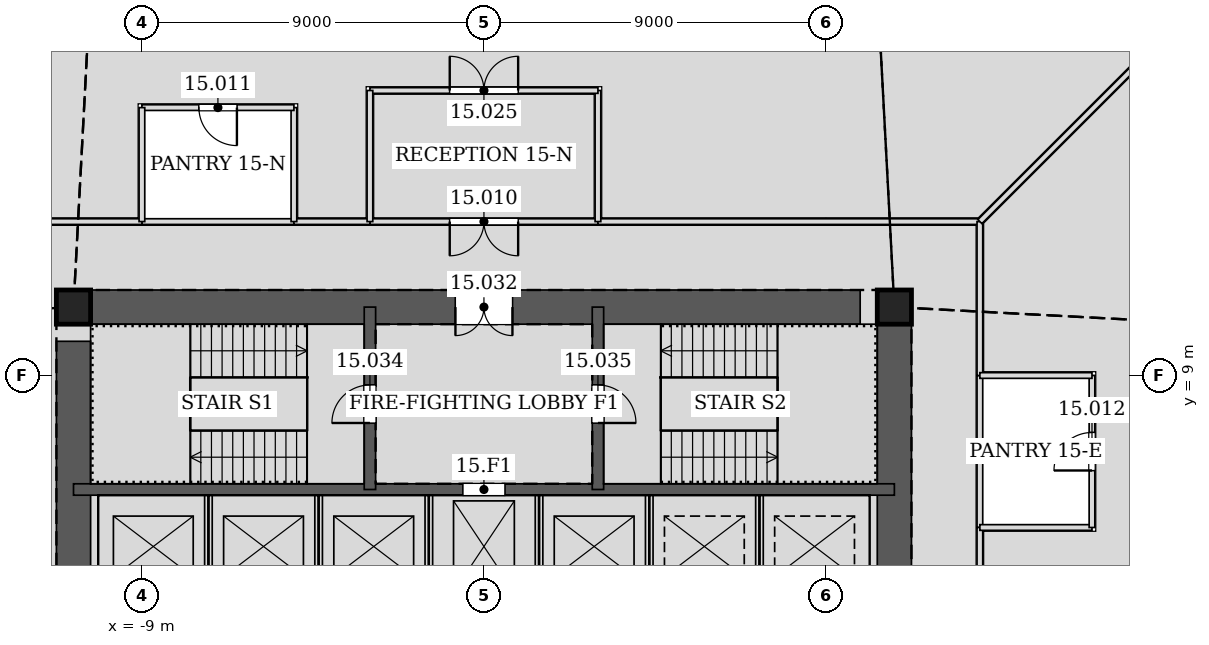
"""IFC4 building model, lengths in metres.
Left out: names, types, materials, properties, quantities, classifications, styles, units other than length and angle.
Written with IfcOpenShell. Run it as: python <this file> out.ifc"""

import sys

from ifc_helpers import new_model, si_unit, direction, frame, frame_2d, origin, origin_2d, place, context, subcontext, project, spatial, rectangle, hollow_rectangle, extrude, element, fill, save


model = new_model("IFC4")
c1 = context("Model", 3, precision=1e-05, world=origin(), true_north=direction((0.0, 1.0)))
c2 = subcontext(c1, "Body", "Model", "MODEL_VIEW")
j1 = project(units=[si_unit("LENGTHUNIT", "METRE"), si_unit("PLANEANGLEUNIT", "RADIAN")], contexts=[c1])
p1 = place(None, origin())
s1 = spatial("IfcSite", under=j1, at=p1, CompositionType="ELEMENT")
p2 = place(p1, origin())
s2 = spatial("IfcBuilding", under=s1, at=p2, CompositionType="ELEMENT")
p3 = place(p2, frame((0.0, 0.0, 70.8)))
s3 = spatial("IfcBuildingStorey", under=s2, at=p3, CompositionType="ELEMENT", Elevation=70.8)
for number, where, z_axis, x_axis in (
    (1, (10.8, 10.8, 0.0), (0.0, 0.0, 1.0), (1.0, 0.0, 0.0)),
    (2, (-10.8, 10.8, 0.0), (0.0, 0.0, 1.0), (1.0, 0.0, 0.0)),
):
    element("IfcColumn", number, at=place(p3, frame(where, z_axis=z_axis, x_axis=x_axis)), inside=s3, PredefinedType="COLUMN", context=c2, shape_type="SweptSolid", body=[
        extrude(hollow_rectangle(XDim=0.9, YDim=0.9, WallThickness=0.06, at=origin_2d()), origin(), (0.0, 0.0, 1.0), 4.2),
    ])
p4 = place(p3, frame((10.8, -10.8, 0.0), z_axis=(0.0, 0.0, 1.0), x_axis=(0.0, 1.0, 0.0)))
e3 = element("IfcWall", 3, at=p4, inside=s3, PredefinedType="SOLIDWALL", context=c2, shape_type="SweptSolid", body=[
    extrude(rectangle(XDim=21.6, YDim=0.9, at=frame_2d((10.8, 0.0))), origin(), (0.0, 0.0, 1.0), 4.2),
])
p5 = place(p4, frame((11.7, 0.0, 0.0)))
e4 = element("IfcOpeningElement", 4, at=p5, cuts=e3, PredefinedType="OPENING", context=c2, shape_type="SweptSolid", body=[
    extrude(rectangle(XDim=1.2, YDim=2.1, at=frame_2d((0.6, 1.05))), frame((0.0, 0.46, 0.0), z_axis=(0.0, -1.0, 0.0), x_axis=(1.0, 0.0, 0.0)), (0.0, 0.0, 1.0), 0.92),
])
p6 = place(p4, frame((8.7, 0.0, 0.0)))
e5 = element("IfcOpeningElement", 5, at=p6, cuts=e3, PredefinedType="OPENING", context=c2, shape_type="SweptSolid", body=[
    extrude(rectangle(XDim=1.2, YDim=2.1, at=frame_2d((0.6, 1.05))), frame((0.0, 0.46, 0.0), z_axis=(0.0, -1.0, 0.0), x_axis=(1.0, 0.0, 0.0)), (0.0, 0.0, 1.0), 0.92),
])
p7 = place(p3, frame((10.8, 10.8, 0.0), z_axis=(0.0, 0.0, 1.0), x_axis=(-1.0, 0.0, 0.0)))
e6 = element("IfcWall", 6, at=p7, inside=s3, PredefinedType="SOLIDWALL", context=c2, shape_type="SweptSolid", body=[
    extrude(rectangle(XDim=21.6, YDim=0.9, at=frame_2d((10.8, 0.0))), origin(), (0.0, 0.0, 1.0), 4.2),
])
p8 = place(p7, frame((10.05, 0.0, 0.0)))
e7 = element("IfcOpeningElement", 7, at=p8, cuts=e6, PredefinedType="OPENING", context=c2, shape_type="SweptSolid", body=[
    extrude(rectangle(XDim=1.5, YDim=2.1, at=frame_2d((0.75, 1.05))), frame((0.0, 0.46, 0.0), z_axis=(0.0, -1.0, 0.0), x_axis=(1.0, 0.0, 0.0)), (0.0, 0.0, 1.0), 0.92),
])
p9 = place(p3, frame((-10.8, 10.8, 0.0), z_axis=(0.0, 0.0, 1.0), x_axis=(0.0, -1.0, 0.0)))
e8 = element("IfcWall", 8, at=p9, inside=s3, PredefinedType="SOLIDWALL", context=c2, shape_type="SweptSolid", body=[
    extrude(rectangle(XDim=21.6, YDim=0.9, at=frame_2d((10.8, 0.0))), origin(), (0.0, 0.0, 1.0), 4.2),
])
p10 = place(p9, frame((8.7, 0.0, 0.0)))
e9 = element("IfcOpeningElement", 9, at=p10, cuts=e8, PredefinedType="OPENING", context=c2, shape_type="SweptSolid", body=[
    extrude(rectangle(XDim=1.2, YDim=2.1, at=frame_2d((0.6, 1.05))), frame((0.0, 0.46, 0.0), z_axis=(0.0, -1.0, 0.0), x_axis=(1.0, 0.0, 0.0)), (0.0, 0.0, 1.0), 0.92),
])
p11 = place(p9, frame((11.7, 0.0, 0.0)))
e10 = element("IfcOpeningElement", 10, at=p11, cuts=e8, PredefinedType="OPENING", context=c2, shape_type="SweptSolid", body=[
    extrude(rectangle(XDim=1.2, YDim=2.1, at=frame_2d((0.6, 1.05))), frame((0.0, 0.46, 0.0), z_axis=(0.0, -1.0, 0.0), x_axis=(1.0, 0.0, 0.0)), (0.0, 0.0, 1.0), 0.92),
])
p12 = place(p3, frame((-10.8, 6.0, 0.0), z_axis=(0.0, 0.0, 1.0), x_axis=(1.0, 0.0, 0.0)))
e11 = element("IfcWall", 11, at=p12, inside=s3, PredefinedType="SOLIDWALL", context=c2, shape_type="SweptSolid", body=[
    extrude(rectangle(XDim=21.6, YDim=0.3, at=frame_2d((10.8, 0.0))), origin(), (0.0, 0.0, 1.0), 4.2),
])
p13 = place(p12, frame((10.25, 0.0, 0.0)))
e12 = element("IfcOpeningElement", 12, at=p13, cuts=e11, PredefinedType="OPENING", context=c2, shape_type="SweptSolid", body=[
    extrude(rectangle(XDim=1.1, YDim=2.1, at=frame_2d((0.55, 1.05))), frame((0.0, 0.16, 0.0), z_axis=(0.0, -1.0, 0.0), x_axis=(1.0, 0.0, 0.0)), (0.0, 0.0, 1.0), 0.32),
])
p14 = place(p3, frame((-3.0, 6.0, 0.0), z_axis=(0.0, 0.0, 1.0), x_axis=(0.0, 1.0, 0.0)))
e13 = element("IfcWall", 13, at=p14, inside=s3, PredefinedType="SOLIDWALL", context=c2, shape_type="SweptSolid", body=[
    extrude(rectangle(XDim=4.8, YDim=0.3, at=frame_2d((2.4, 0.0))), origin(), (0.0, 0.0, 1.0), 4.2),
])
p15 = place(p14, frame((1.75, 0.0, 0.0)))
e14 = element("IfcOpeningElement", 14, at=p15, cuts=e13, PredefinedType="OPENING", context=c2, shape_type="SweptSolid", body=[
    extrude(rectangle(XDim=1.0, YDim=2.1, at=frame_2d((0.5, 1.05))), frame((0.0, 0.16, 0.0), z_axis=(0.0, -1.0, 0.0), x_axis=(1.0, 0.0, 0.0)), (0.0, 0.0, 1.0), 0.32),
])
p16 = place(p3, frame((3.0, 6.0, 0.0), z_axis=(0.0, 0.0, 1.0), x_axis=(0.0, 1.0, 0.0)))
e15 = element("IfcWall", 15, at=p16, inside=s3, PredefinedType="SOLIDWALL", context=c2, shape_type="SweptSolid", body=[
    extrude(rectangle(XDim=4.8, YDim=0.3, at=frame_2d((2.4, 0.0))), origin(), (0.0, 0.0, 1.0), 4.2),
])
p17 = place(p16, frame((1.75, 0.0, 0.0)))
e16 = element("IfcOpeningElement", 16, at=p17, cuts=e15, PredefinedType="OPENING", context=c2, shape_type="SweptSolid", body=[
    extrude(rectangle(XDim=1.0, YDim=2.1, at=frame_2d((0.5, 1.05))), frame((0.0, 0.16, 0.0), z_axis=(0.0, -1.0, 0.0), x_axis=(1.0, 0.0, 0.0)), (0.0, 0.0, 1.0), 0.32),
])
p18 = place(p3, frame((3.001, 13.05, 0.0), z_axis=(0.0, 0.0, 1.0), x_axis=(-1.0, 0.0, 0.0)))
e17 = element("IfcWall", 17, at=p18, inside=s3, PredefinedType="PARTITIONING", context=c2, shape_type="SweptSolid", body=[
    extrude(rectangle(XDim=6.002, YDim=0.15, at=frame_2d((3.001, 0.0))), origin(), (0.0, 0.0, 1.0), 3.065),
])
p19 = place(p18, frame((2.101, 0.0, 0.0)))
e18 = element("IfcOpeningElement", 18, at=p19, cuts=e17, PredefinedType="OPENING", context=c2, shape_type="SweptSolid", body=[
    extrude(rectangle(XDim=1.8, YDim=2.4, at=frame_2d((0.9, 1.2))), frame((0.0, 0.085, 0.0), z_axis=(0.0, -1.0, 0.0), x_axis=(1.0, 0.0, 0.0)), (0.0, 0.0, 1.0), 0.17),
])
for number, where, z_axis, x_axis in (
    (19, (-4.999, 13.05, 0.0), (0.0, 0.0, 1.0), (-1.0, 0.0, 0.0)),
    (20, (13.05, 4.999, 0.0), (0.0, 0.0, 1.0), (0.0, 1.0, 0.0)),
):
    element("IfcWall", number, at=place(p3, frame(where, z_axis=z_axis, x_axis=x_axis)), inside=s3, PredefinedType="PARTITIONING", context=c2, shape_type="SweptSolid", body=[
        extrude(rectangle(XDim=4.002, YDim=0.15, at=frame_2d((2.001, 0.0))), origin(), (0.0, 0.0, 1.0), 4.035),
    ])
p20 = place(p3, frame((-8.999, 13.05, 0.0), z_axis=(0.0, 0.0, 1.0), x_axis=(-1.0, 0.0, 0.0)))
e21 = element("IfcWall", 21, at=p20, inside=s3, PredefinedType="PARTITIONING", context=c2, shape_type="SweptSolid", body=[
    extrude(rectangle(XDim=4.051, YDim=0.15, at=frame_2d((2.025, 0.0))), origin(), (0.0, 0.0, 1.0), 3.014),
])
p21 = place(p3, frame((-2.999, 13.05, 0.0), z_axis=(0.0, 0.0, 1.0), x_axis=(-1.0, 0.0, 0.0)))
e22 = element("IfcWall", 22, at=p21, inside=s3, PredefinedType="PARTITIONING", context=c2, shape_type="SweptSolid", body=[
    extrude(rectangle(XDim=2.002, YDim=0.15, at=frame_2d((1.001, 0.0))), origin(), (0.0, 0.0, 1.0), 4.035),
])
p22 = place(p3, frame((13.05, 13.05, 0.0), z_axis=(0.0, 0.0, 1.0), x_axis=(-1.0, 0.0, 0.0)))
e23 = element("IfcWall", 23, at=p22, inside=s3, PredefinedType="PARTITIONING", context=c2, shape_type="SweptSolid", body=[
    extrude(rectangle(XDim=10.051, YDim=0.15, at=frame_2d((5.025, 0.0))), origin(), (0.0, 0.0, 1.0), 3.014),
])
p23 = place(p3, frame((13.05, 8.999, 0.0), z_axis=(0.0, 0.0, 1.0), x_axis=(0.0, 1.0, 0.0)))
e24 = element("IfcWall", 24, at=p23, inside=s3, PredefinedType="PARTITIONING", context=c2, shape_type="SweptSolid", body=[
    extrude(rectangle(XDim=4.051, YDim=0.15, at=frame_2d((2.025, 0.0))), origin(), (0.0, 0.0, 1.0), 3.014),
])
p24 = place(p3, frame((13.05, -10.05, 0.0), z_axis=(0.0, 0.0, 1.0), x_axis=(0.0, 1.0, 0.0)))
e25 = element("IfcWall", 25, at=p24, inside=s3, PredefinedType="PARTITIONING", context=c2, shape_type="SweptSolid", body=[
    extrude(rectangle(XDim=15.051, YDim=0.15, at=frame_2d((7.525, 0.0))), origin(), (0.0, 0.0, 1.0), 3.065),
])
p25 = place(p24, frame((6.625, 0.0, 0.0)))
e26 = element("IfcOpeningElement", 26, at=p25, cuts=e25, PredefinedType="OPENING", context=c2, shape_type="SweptSolid", body=[
    extrude(rectangle(XDim=1.8, YDim=2.4, at=frame_2d((0.9, 1.2))), frame((0.0, 0.085, 0.0), z_axis=(0.0, -1.0, 0.0), x_axis=(1.0, 0.0, 0.0)), (0.0, 0.0, 1.0), 0.17),
])
p26 = place(p3, frame((3.0, 13.05, 0.0), z_axis=(0.0, 0.0, 1.0), x_axis=(0.0, 1.0, 0.0)))
e27 = element("IfcWall", 27, at=p26, inside=s3, PredefinedType="PARTITIONING", context=c2, shape_type="SweptSolid", body=[
    extrude(rectangle(XDim=3.45, YDim=0.15, at=frame_2d((1.725, 0.0))), origin(), (0.0, 0.0, 1.0), 3.423),
])
p27 = place(p3, frame((3.0, 16.5, 0.0), z_axis=(0.0, 0.0, 1.0), x_axis=(-1.0, 0.0, 0.0)))
e28 = element("IfcWall", 28, at=p27, inside=s3, PredefinedType="PARTITIONING", context=c2, shape_type="SweptSolid", body=[
    extrude(rectangle(XDim=6.0, YDim=0.15, at=frame_2d((3.0, 0.0))), origin(), (0.0, 0.0, 1.0), 3.065),
])
p28 = place(p27, frame((2.1, 0.0, 0.0)))
e29 = element("IfcOpeningElement", 29, at=p28, cuts=e28, PredefinedType="OPENING", context=c2, shape_type="SweptSolid", body=[
    extrude(rectangle(XDim=1.8, YDim=2.4, at=frame_2d((0.9, 1.2))), frame((0.0, 0.085, 0.0), z_axis=(0.0, -1.0, 0.0), x_axis=(1.0, 0.0, 0.0)), (0.0, 0.0, 1.0), 0.17),
])
p29 = place(p3, frame((-3.0, 16.5, 0.0), z_axis=(0.0, 0.0, 1.0), x_axis=(0.0, -1.0, 0.0)))
e30 = element("IfcWall", 30, at=p29, inside=s3, PredefinedType="PARTITIONING", context=c2, shape_type="SweptSolid", body=[
    extrude(rectangle(XDim=3.45, YDim=0.15, at=frame_2d((1.725, 0.0))), origin(), (0.0, 0.0, 1.0), 3.423),
])
p30 = place(p3, frame((-5.0, 13.05, 0.0), z_axis=(0.0, 0.0, 1.0), x_axis=(0.0, 1.0, 0.0)))
e31 = element("IfcWall", 31, at=p30, inside=s3, PredefinedType="PARTITIONING", context=c2, shape_type="SweptSolid", body=[
    extrude(rectangle(XDim=3.0, YDim=0.15, at=frame_2d((1.5, 0.0))), origin(), (0.0, 0.0, 1.0), 3.423),
])
p31 = place(p3, frame((-5.0, 16.05, 0.0), z_axis=(0.0, 0.0, 1.0), x_axis=(-1.0, 0.0, 0.0)))
e32 = element("IfcWall", 32, at=p31, inside=s3, PredefinedType="PARTITIONING", context=c2, shape_type="SweptSolid", body=[
    extrude(rectangle(XDim=4.0, YDim=0.15, at=frame_2d((2.0, 0.0))), origin(), (0.0, 0.0, 1.0), 4.035),
])
p32 = place(p31, frame((1.5, 0.0, 0.0)))
e33 = element("IfcOpeningElement", 33, at=p32, cuts=e32, PredefinedType="OPENING", context=c2, shape_type="SweptSolid", body=[
    extrude(rectangle(XDim=1.0, YDim=2.1, at=frame_2d((0.5, 1.05))), frame((0.0, 0.085, 0.0), z_axis=(0.0, -1.0, 0.0), x_axis=(1.0, 0.0, 0.0)), (0.0, 0.0, 1.0), 0.17),
])
p33 = place(p3, frame((-9.0, 16.05, 0.0), z_axis=(0.0, 0.0, 1.0), x_axis=(0.0, -1.0, 0.0)))
e34 = element("IfcWall", 34, at=p33, inside=s3, PredefinedType="PARTITIONING", context=c2, shape_type="SweptSolid", body=[
    extrude(rectangle(XDim=3.0, YDim=0.15, at=frame_2d((1.5, 0.0))), origin(), (0.0, 0.0, 1.0), 3.423),
])
p34 = place(p3, frame((13.05, 5.0, 0.0), z_axis=(0.0, 0.0, 1.0), x_axis=(1.0, 0.0, 0.0)))
e35 = element("IfcWall", 35, at=p34, inside=s3, PredefinedType="PARTITIONING", context=c2, shape_type="SweptSolid", body=[
    extrude(rectangle(XDim=2.95, YDim=0.15, at=frame_2d((1.475, 0.0))), origin(), (0.0, 0.0, 1.0), 3.423),
])
p35 = place(p3, frame((16.0, 5.0, 0.0), z_axis=(0.0, 0.0, 1.0), x_axis=(0.0, 1.0, 0.0)))
e36 = element("IfcWall", 36, at=p35, inside=s3, PredefinedType="PARTITIONING", context=c2, shape_type="SweptSolid", body=[
    extrude(rectangle(XDim=4.0, YDim=0.15, at=frame_2d((2.0, 0.0))), origin(), (0.0, 0.0, 1.0), 4.035),
])
p36 = place(p35, frame((1.5, 0.0, 0.0)))
e37 = element("IfcOpeningElement", 37, at=p36, cuts=e36, PredefinedType="OPENING", context=c2, shape_type="SweptSolid", body=[
    extrude(rectangle(XDim=1.0, YDim=2.1, at=frame_2d((0.5, 1.05))), frame((0.0, 0.085, 0.0), z_axis=(0.0, -1.0, 0.0), x_axis=(1.0, 0.0, 0.0)), (0.0, 0.0, 1.0), 0.17),
])
p37 = place(p3, frame((16.0, 9.0, 0.0), z_axis=(0.0, 0.0, 1.0), x_axis=(-1.0, 0.0, 0.0)))
e38 = element("IfcWall", 38, at=p37, inside=s3, PredefinedType="PARTITIONING", context=c2, shape_type="SweptSolid", body=[
    extrude(rectangle(XDim=2.95, YDim=0.15, at=frame_2d((1.475, 0.0))), origin(), (0.0, 0.0, 1.0), 3.423),
])
p38 = place(p3, frame((13.05, 13.05, 0.0), z_axis=(0.0, 0.0, 1.0), x_axis=(0.707106781187, 0.707106781187, 0.0)))
e39 = element("IfcWall", 39, at=p38, inside=s3, PredefinedType="PARTITIONING", context=c2, shape_type="SweptSolid", body=[
    extrude(rectangle(XDim=6.368, YDim=0.15, at=frame_2d((3.184, 0.0))), origin(), (0.0, 0.0, 1.0), 3.113),
])
for number, where, z_axis, x_axis in (
    (40, (-7.25, 3.15, 0.0), (0.0, 0.0, 1.0), (0.0, 1.0, 0.0)),
    (41, (-4.35, 3.15, 0.0), (0.0, 0.0, 1.0), (0.0, 1.0, 0.0)),
    (42, (-1.45, 3.15, 0.0), (0.0, 0.0, 1.0), (0.0, 1.0, 0.0)),
    (43, (1.45, 3.15, 0.0), (0.0, 0.0, 1.0), (0.0, 1.0, 0.0)),
    (44, (4.35, 3.15, 0.0), (0.0, 0.0, 1.0), (0.0, 1.0, 0.0)),
    (45, (7.25, 3.15, 0.0), (0.0, 0.0, 1.0), (0.0, 1.0, 0.0)),
):
    element("IfcWall", number, at=place(p3, frame(where, z_axis=z_axis, x_axis=x_axis)), inside=s3, PredefinedType="PARTITIONING", context=c2, shape_type="SweptSolid", body=[
        extrude(rectangle(XDim=2.7, YDim=0.2, at=frame_2d((1.35, 0.0))), origin(), (0.0, 0.0, 1.0), 4.2),
    ])
p39 = place(p19, origin())
e46 = element("IfcDoor", 46, at=p39, inside=s3, OperationType="DOUBLE_DOOR_SINGLE_SWING", PredefinedType="DOOR", context=c2, shape_type="SweptSolid", body=[
    extrude(rectangle(XDim=1.8, YDim=2.4, at=frame_2d((0.9, 1.2))), frame((0.0, 0.025, 0.0), z_axis=(0.0, -1.0, 0.0), x_axis=(1.0, 0.0, 0.0)), (0.0, 0.0, 1.0), 0.05),
])
fill(e18, e46)
p40 = place(p32, origin())
e47 = element("IfcDoor", 47, at=p40, inside=s3, OperationType="SINGLE_SWING_LEFT", PredefinedType="DOOR", context=c2, shape_type="SweptSolid", body=[
    extrude(rectangle(XDim=1.0, YDim=2.1, at=frame_2d((0.5, 1.05))), frame((0.0, 0.025, 0.0), z_axis=(0.0, -1.0, 0.0), x_axis=(1.0, 0.0, 0.0)), (0.0, 0.0, 1.0), 0.05),
])
fill(e33, e47)
p41 = place(p36, origin())
e48 = element("IfcDoor", 48, at=p41, inside=s3, OperationType="SINGLE_SWING_LEFT", PredefinedType="DOOR", context=c2, shape_type="SweptSolid", body=[
    extrude(rectangle(XDim=1.0, YDim=2.1, at=frame_2d((0.5, 1.05))), frame((0.0, 0.025, 0.0), z_axis=(0.0, -1.0, 0.0), x_axis=(1.0, 0.0, 0.0)), (0.0, 0.0, 1.0), 0.05),
])
fill(e37, e48)
p42 = place(p28, frame((1.8, 0.0, 0.0), z_axis=(0.0, 0.0, 1.0), x_axis=(-1.0, 0.0, 0.0)))
e49 = element("IfcDoor", 49, at=p42, inside=s3, OperationType="DOUBLE_DOOR_SINGLE_SWING", PredefinedType="DOOR", context=c2, shape_type="SweptSolid", body=[
    extrude(rectangle(XDim=1.8, YDim=2.4, at=frame_2d((0.9, 1.2))), frame((0.0, 0.025, 0.0), z_axis=(0.0, -1.0, 0.0), x_axis=(1.0, 0.0, 0.0)), (0.0, 0.0, 1.0), 0.05),
])
fill(e29, e49)
p43 = place(p8, origin())
e50 = element("IfcDoor", 50, at=p43, inside=s3, OperationType="DOUBLE_DOOR_SINGLE_SWING", PredefinedType="DOOR", context=c2, shape_type="SweptSolid", body=[
    extrude(rectangle(XDim=1.5, YDim=2.1, at=frame_2d((0.75, 1.05))), frame((0.0, 0.025, 0.0), z_axis=(0.0, -1.0, 0.0), x_axis=(1.0, 0.0, 0.0)), (0.0, 0.0, 1.0), 0.05),
])
fill(e7, e50)
p44 = place(p15, origin())
e51 = element("IfcDoor", 51, at=p44, inside=s3, OperationType="SINGLE_SWING_LEFT", PredefinedType="DOOR", context=c2, shape_type="SweptSolid", body=[
    extrude(rectangle(XDim=1.0, YDim=2.1, at=frame_2d((0.5, 1.05))), frame((0.0, 0.025, 0.0), z_axis=(0.0, -1.0, 0.0), x_axis=(1.0, 0.0, 0.0)), (0.0, 0.0, 1.0), 0.05),
])
fill(e14, e51)
p45 = place(p17, frame((1.0, 0.0, 0.0), z_axis=(0.0, 0.0, 1.0), x_axis=(-1.0, 0.0, 0.0)))
e52 = element("IfcDoor", 52, at=p45, inside=s3, OperationType="SINGLE_SWING_RIGHT", PredefinedType="DOOR", context=c2, shape_type="SweptSolid", body=[
    extrude(rectangle(XDim=1.0, YDim=2.1, at=frame_2d((0.5, 1.05))), frame((0.0, 0.025, 0.0), z_axis=(0.0, -1.0, 0.0), x_axis=(1.0, 0.0, 0.0)), (0.0, 0.0, 1.0), 0.05),
])
fill(e16, e52)
p46 = place(p13, origin())
e53 = element("IfcDoor", 53, at=p46, inside=s3, OperationType="DOUBLE_DOOR_SLIDING", PredefinedType="DOOR", context=c2, shape_type="SweptSolid", body=[
    extrude(rectangle(XDim=1.1, YDim=2.1, at=frame_2d((0.55, 1.05))), frame((0.0, 0.025, 0.0), z_axis=(0.0, -1.0, 0.0), x_axis=(1.0, 0.0, 0.0)), (0.0, 0.0, 1.0), 0.05),
])
fill(e12, e53)
save(model, sys.argv[1])
